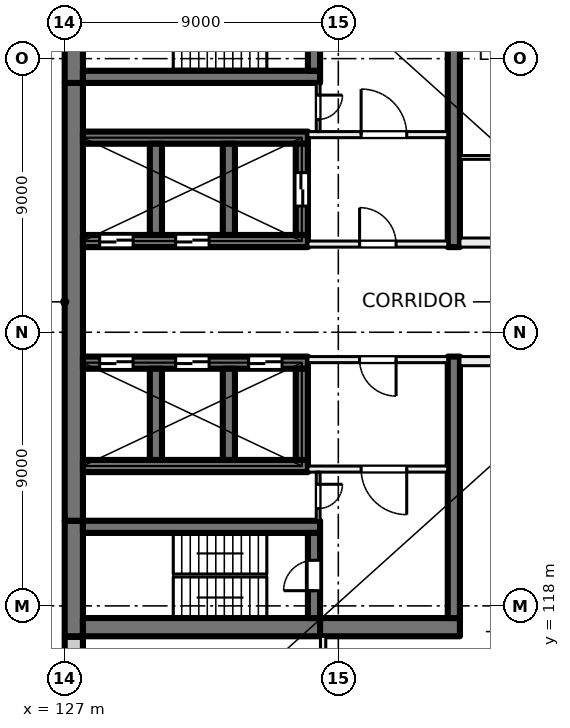
"""IFC4 building model, lengths in metres.
Left out: names, types, materials, properties, quantities, classifications, styles, units other than length and angle.
Written with IfcOpenShell. Run it as: python <this file> out.ifc"""

import sys

from ifc_helpers import new_model, si_unit, direction, frame, frame_2d, origin, place, context, subcontext, project, spatial, rectangle, extrude, element, fill, save


model = new_model("IFC4")
c1 = context("Model", 3, precision=1e-05, world=origin(), true_north=direction((0.0, 1.0)))
c2 = subcontext(c1, "Body", "Model", "MODEL_VIEW")
j1 = project(units=[si_unit("LENGTHUNIT", "METRE"), si_unit("PLANEANGLEUNIT", "RADIAN")], contexts=[c1])
p1 = place(None, origin())
s1 = spatial("IfcSite", under=j1, at=p1, CompositionType="ELEMENT")
p2 = place(p1, origin())
s2 = spatial("IfcBuilding", under=s1, at=p2, CompositionType="ELEMENT")
p3 = place(p2, frame((0.0, 0.0, 27.5)))
s3 = spatial("IfcBuildingStorey", under=s2, at=p3, CompositionType="ELEMENT", Elevation=27.5)
p4 = place(p3, frame((127.3, 117.0, 0.0), z_axis=(0.0, 0.0, 1.0), x_axis=(0.0, 1.0, 0.0)))
e1 = element("IfcWall", 1, at=p4, inside=s3, PredefinedType="SHEAR", context=c2, shape_type="SweptSolid", body=[
    extrude(rectangle(XDim=3.8, YDim=0.6, at=frame_2d((1.9, 0.0))), origin(), (0.0, 0.0, 1.0), 4.0),
])
p5 = place(p3, frame((127.3, 120.8, 0.0), z_axis=(0.0, 0.0, 1.0), x_axis=(0.0, 1.0, 0.0)))
e2 = element("IfcWall", 2, at=p5, inside=s3, PredefinedType="SHEAR", context=c2, shape_type="SweptSolid", body=[
    extrude(rectangle(XDim=14.4, YDim=0.6, at=frame_2d((7.2, 0.0))), origin(), (0.0, 0.0, 1.0), 4.0),
])
p6 = place(p3, frame((127.3, 135.2, 0.0), z_axis=(0.0, 0.0, 1.0), x_axis=(0.0, 1.0, 0.0)))
e3 = element("IfcWall", 3, at=p6, inside=s3, PredefinedType="SHEAR", context=c2, shape_type="SweptSolid", body=[
    extrude(rectangle(XDim=3.8, YDim=0.6, at=frame_2d((1.9, 0.0))), origin(), (0.0, 0.0, 1.0), 4.0),
])
p7 = place(p3, frame((127.6, 117.3, 0.0), z_axis=(0.0, 0.0, 1.0), x_axis=(1.0, 0.0, 0.0)))
e4 = element("IfcWall", 4, at=p7, inside=s3, PredefinedType="SHEAR", context=c2, shape_type="SweptSolid", body=[
    extrude(rectangle(XDim=7.8, YDim=0.6, at=frame_2d((3.9, 0.0))), origin(), (0.0, 0.0, 1.0), 4.0),
])
p8 = place(p3, frame((135.4, 117.3, 0.0), z_axis=(0.0, 0.0, 1.0), x_axis=(1.0, 0.0, 0.0)))
e5 = element("IfcWall", 5, at=p8, inside=s3, PredefinedType="SHEAR", context=c2, shape_type="SweptSolid", body=[
    extrude(rectangle(XDim=4.6, YDim=0.6, at=frame_2d((2.3, 0.0))), origin(), (0.0, 0.0, 1.0), 4.0),
])
p9 = place(p3, frame((127.6, 120.6, 0.0), z_axis=(0.0, 0.0, 1.0), x_axis=(1.0, 0.0, 0.0)))
e6 = element("IfcWall", 6, at=p9, inside=s3, PredefinedType="SHEAR", context=c2, shape_type="SweptSolid", body=[
    extrude(rectangle(XDim=7.8, YDim=0.4, at=frame_2d((3.9, 0.0))), origin(), (0.0, 0.0, 1.0), 4.0),
])
p10 = place(p3, frame((135.2, 117.6, 0.0), z_axis=(0.0, 0.0, 1.0), x_axis=(0.0, 1.0, 0.0)))
e7 = element("IfcWall", 7, at=p10, inside=s3, PredefinedType="SHEAR", context=c2, shape_type="SweptSolid", body=[
    extrude(rectangle(XDim=2.8, YDim=0.4, at=frame_2d((1.4, 0.0))), origin(), (0.0, 0.0, 1.0), 4.0),
])
p11 = place(p10, frame((0.9, 0.0, 0.0)))
e8 = element("IfcOpeningElement", 8, at=p11, cuts=e7, PredefinedType="OPENING", context=c2, shape_type="SweptSolid", body=[
    extrude(rectangle(XDim=1.0, YDim=2.1, at=frame_2d((0.5, 1.05))), frame((0.0, 0.21, 0.0), z_axis=(0.0, -1.0, 0.0), x_axis=(1.0, 0.0, 0.0)), (0.0, 0.0, 1.0), 0.42),
])
p12 = place(p3, frame((127.6, 135.4, 0.0), z_axis=(0.0, 0.0, 1.0), x_axis=(1.0, 0.0, 0.0)))
e9 = element("IfcWall", 9, at=p12, inside=s3, PredefinedType="SHEAR", context=c2, shape_type="SweptSolid", body=[
    extrude(rectangle(XDim=7.8, YDim=0.4, at=frame_2d((3.9, 0.0))), origin(), (0.0, 0.0, 1.0), 4.0),
])
p13 = place(p3, frame((135.2, 135.6, 0.0), z_axis=(0.0, 0.0, 1.0), x_axis=(0.0, 1.0, 0.0)))
e10 = element("IfcWall", 10, at=p13, inside=s3, PredefinedType="SHEAR", context=c2, shape_type="SweptSolid", body=[
    extrude(rectangle(XDim=2.8, YDim=0.4, at=frame_2d((1.4, 0.0))), origin(), (0.0, 0.0, 1.0), 4.0),
])
p14 = place(p13, frame((0.9, 0.0, 0.0)))
e11 = element("IfcOpeningElement", 11, at=p14, cuts=e10, PredefinedType="OPENING", context=c2, shape_type="SweptSolid", body=[
    extrude(rectangle(XDim=1.0, YDim=2.1, at=frame_2d((0.5, 1.05))), frame((0.0, 0.21, 0.0), z_axis=(0.0, -1.0, 0.0), x_axis=(1.0, 0.0, 0.0)), (0.0, 0.0, 1.0), 0.42),
])
p15 = place(p3, frame((127.6, 126.0, 0.0), z_axis=(0.0, 0.0, 1.0), x_axis=(1.0, 0.0, 0.0)))
e12 = element("IfcWall", 12, at=p15, inside=s3, PredefinedType="SHEAR", context=c2, shape_type="SweptSolid", body=[
    extrude(rectangle(XDim=7.4, YDim=0.4, at=frame_2d((3.7, 0.0))), origin(), (0.0, 0.0, 1.0), 4.0),
])
p16 = place(p15, frame((0.55, 0.0, 0.0)))
e13 = element("IfcOpeningElement", 13, at=p16, cuts=e12, PredefinedType="OPENING", context=c2, shape_type="SweptSolid", body=[
    extrude(rectangle(XDim=1.1, YDim=2.1, at=frame_2d((0.55, 1.05))), frame((0.0, 0.21, 0.0), z_axis=(0.0, -1.0, 0.0), x_axis=(1.0, 0.0, 0.0)), (0.0, 0.0, 1.0), 0.42),
])
p17 = place(p15, frame((3.05, 0.0, 0.0)))
e14 = element("IfcOpeningElement", 14, at=p17, cuts=e12, PredefinedType="OPENING", context=c2, shape_type="SweptSolid", body=[
    extrude(rectangle(XDim=1.1, YDim=2.1, at=frame_2d((0.55, 1.05))), frame((0.0, 0.21, 0.0), z_axis=(0.0, -1.0, 0.0), x_axis=(1.0, 0.0, 0.0)), (0.0, 0.0, 1.0), 0.42),
])
p18 = place(p15, frame((5.45, 0.0, 0.0)))
e15 = element("IfcOpeningElement", 15, at=p18, cuts=e12, PredefinedType="OPENING", context=c2, shape_type="SweptSolid", body=[
    extrude(rectangle(XDim=1.1, YDim=2.1, at=frame_2d((0.55, 1.05))), frame((0.0, 0.21, 0.0), z_axis=(0.0, -1.0, 0.0), x_axis=(1.0, 0.0, 0.0)), (0.0, 0.0, 1.0), 0.42),
])
p19 = place(p3, frame((127.6, 122.6, 0.0), z_axis=(0.0, 0.0, 1.0), x_axis=(1.0, 0.0, 0.0)))
e16 = element("IfcWall", 16, at=p19, inside=s3, PredefinedType="SHEAR", context=c2, shape_type="SweptSolid", body=[
    extrude(rectangle(XDim=7.4, YDim=0.4, at=frame_2d((3.7, 0.0))), origin(), (0.0, 0.0, 1.0), 4.0),
])
for number, where, z_axis, x_axis in (
    (17, (130.0, 122.8, 0.0), (0.0, 0.0, 1.0), (0.0, 1.0, 0.0)),
    (18, (132.4, 122.8, 0.0), (0.0, 0.0, 1.0), (0.0, 1.0, 0.0)),
    (19, (134.8, 122.8, 0.0), (0.0, 0.0, 1.0), (0.0, 1.0, 0.0)),
):
    element("IfcWall", number, at=place(p3, frame(where, z_axis=z_axis, x_axis=x_axis)), inside=s3, PredefinedType="SHEAR", context=c2, shape_type="SweptSolid", body=[
        extrude(rectangle(XDim=3.0, YDim=0.4, at=frame_2d((1.5, 0.0))), origin(), (0.0, 0.0, 1.0), 4.0),
    ])
p20 = place(p3, frame((127.6, 130.0, 0.0), z_axis=(0.0, 0.0, 1.0), x_axis=(1.0, 0.0, 0.0)))
e20 = element("IfcWall", 20, at=p20, inside=s3, PredefinedType="SHEAR", context=c2, shape_type="SweptSolid", body=[
    extrude(rectangle(XDim=7.4, YDim=0.4, at=frame_2d((3.7, 0.0))), origin(), (0.0, 0.0, 1.0), 4.0),
])
p21 = place(p20, frame((0.55, 0.0, 0.0)))
e21 = element("IfcOpeningElement", 21, at=p21, cuts=e20, PredefinedType="OPENING", context=c2, shape_type="SweptSolid", body=[
    extrude(rectangle(XDim=1.1, YDim=2.1, at=frame_2d((0.55, 1.05))), frame((0.0, 0.21, 0.0), z_axis=(0.0, -1.0, 0.0), x_axis=(1.0, 0.0, 0.0)), (0.0, 0.0, 1.0), 0.42),
])
p22 = place(p20, frame((3.05, 0.0, 0.0)))
e22 = element("IfcOpeningElement", 22, at=p22, cuts=e20, PredefinedType="OPENING", context=c2, shape_type="SweptSolid", body=[
    extrude(rectangle(XDim=1.1, YDim=2.1, at=frame_2d((0.55, 1.05))), frame((0.0, 0.21, 0.0), z_axis=(0.0, -1.0, 0.0), x_axis=(1.0, 0.0, 0.0)), (0.0, 0.0, 1.0), 0.42),
])
p23 = place(p3, frame((127.6, 133.4, 0.0), z_axis=(0.0, 0.0, 1.0), x_axis=(1.0, 0.0, 0.0)))
e23 = element("IfcWall", 23, at=p23, inside=s3, PredefinedType="SHEAR", context=c2, shape_type="SweptSolid", body=[
    extrude(rectangle(XDim=7.4, YDim=0.4, at=frame_2d((3.7, 0.0))), origin(), (0.0, 0.0, 1.0), 4.0),
])
for number, where, z_axis, x_axis in (
    (24, (130.0, 130.2, 0.0), (0.0, 0.0, 1.0), (0.0, 1.0, 0.0)),
    (25, (132.4, 130.2, 0.0), (0.0, 0.0, 1.0), (0.0, 1.0, 0.0)),
):
    element("IfcWall", number, at=place(p3, frame(where, z_axis=z_axis, x_axis=x_axis)), inside=s3, PredefinedType="SHEAR", context=c2, shape_type="SweptSolid", body=[
        extrude(rectangle(XDim=3.0, YDim=0.4, at=frame_2d((1.5, 0.0))), origin(), (0.0, 0.0, 1.0), 4.0),
    ])
p24 = place(p3, frame((134.8, 130.2, 0.0), z_axis=(0.0, 0.0, 1.0), x_axis=(0.0, 1.0, 0.0)))
e26 = element("IfcWall", 26, at=p24, inside=s3, PredefinedType="SHEAR", context=c2, shape_type="SweptSolid", body=[
    extrude(rectangle(XDim=3.0, YDim=0.4, at=frame_2d((1.5, 0.0))), origin(), (0.0, 0.0, 1.0), 4.0),
])
p25 = place(p24, frame((0.95, 0.0, 0.0)))
e27 = element("IfcOpeningElement", 27, at=p25, cuts=e26, PredefinedType="OPENING", context=c2, shape_type="SweptSolid", body=[
    extrude(rectangle(XDim=1.1, YDim=2.1, at=frame_2d((0.55, 1.05))), frame((0.0, 0.21, 0.0), z_axis=(0.0, -1.0, 0.0), x_axis=(1.0, 0.0, 0.0)), (0.0, 0.0, 1.0), 0.42),
])
for number, where, z_axis, x_axis in (
    (28, (139.8, 117.6, 0.0), (0.0, 0.0, 1.0), (0.0, 1.0, 0.0)),
    (29, (139.8, 129.8, 0.0), (0.0, 0.0, 1.0), (0.0, 1.0, 0.0)),
):
    element("IfcWall", number, at=place(p3, frame(where, z_axis=z_axis, x_axis=x_axis)), inside=s3, PredefinedType="SHEAR", context=c2, shape_type="SweptSolid", body=[
        extrude(rectangle(XDim=8.6, YDim=0.4, at=frame_2d((4.3, 0.0))), origin(), (0.0, 0.0, 1.0), 4.0),
    ])
p26 = place(p3, frame((127.3, 114.07, 0.0), z_axis=(0.0, 0.0, 1.0), x_axis=(0.0, 1.0, 0.0)))
e30 = element("IfcWall", 30, at=p26, inside=s3, PredefinedType="SOLIDWALL", context=c2, shape_type="SweptSolid", body=[
    extrude(rectangle(XDim=2.91, YDim=0.6, at=frame_2d((1.455, 0.0))), origin(), (0.0, 0.0, 1.0), 3.625),
])
p27 = place(p3, frame((135.0, 129.9, 0.0), z_axis=(0.0, 0.0, 1.0), x_axis=(1.0, 0.0, 0.0)))
e31 = element("IfcWall", 31, at=p27, inside=s3, PredefinedType="PARTITIONING", context=c2, shape_type="SweptSolid", body=[
    extrude(rectangle(XDim=4.6, YDim=0.2, at=frame_2d((2.3, 0.0))), origin(), (0.0, 0.0, 1.0), 3.625),
])
p28 = place(p27, frame((1.7, 0.0, 0.0)))
e32 = element("IfcOpeningElement", 32, at=p28, cuts=e31, PredefinedType="OPENING", context=c2, shape_type="SweptSolid", body=[
    extrude(rectangle(XDim=1.2, YDim=2.1, at=frame_2d((0.6, 1.05))), frame((0.0, 0.11, 0.0), z_axis=(0.0, -1.0, 0.0), x_axis=(1.0, 0.0, 0.0)), (0.0, 0.0, 1.0), 0.22),
])
p29 = place(p3, frame((135.0, 133.5, 0.0), z_axis=(0.0, 0.0, 1.0), x_axis=(1.0, 0.0, 0.0)))
e33 = element("IfcWall", 33, at=p29, inside=s3, PredefinedType="PARTITIONING", context=c2, shape_type="SweptSolid", body=[
    extrude(rectangle(XDim=4.6, YDim=0.2, at=frame_2d((2.3, 0.0))), origin(), (0.0, 0.0, 1.0), 3.625),
])
p30 = place(p29, frame((1.75, 0.0, 0.0)))
e34 = element("IfcOpeningElement", 34, at=p30, cuts=e33, PredefinedType="OPENING", context=c2, shape_type="SweptSolid", body=[
    extrude(rectangle(XDim=1.5, YDim=2.1, at=frame_2d((0.75, 1.05))), frame((0.0, 0.11, 0.0), z_axis=(0.0, -1.0, 0.0), x_axis=(1.0, 0.0, 0.0)), (0.0, 0.0, 1.0), 0.22),
])
p31 = place(p3, frame((135.337, 135.2, 0.0), z_axis=(0.0, 0.0, 1.0), x_axis=(0.0, -1.0, 0.0)))
e35 = element("IfcWall", 35, at=p31, inside=s3, PredefinedType="PARTITIONING", context=c2, shape_type="SweptSolid", body=[
    extrude(rectangle(XDim=1.6, YDim=0.125, at=frame_2d((0.8, 0.0))), origin(), (0.0, 0.0, 1.0), 3.625),
])
p32 = place(p31, frame((0.4, 0.0, 0.0)))
e36 = element("IfcOpeningElement", 36, at=p32, cuts=e35, PredefinedType="OPENING", context=c2, shape_type="SweptSolid", body=[
    extrude(rectangle(XDim=0.8, YDim=2.1, at=frame_2d((0.4, 1.05))), frame((0.0, 0.073, 0.0), z_axis=(0.0, -1.0, 0.0), x_axis=(1.0, 0.0, 0.0)), (0.0, 0.0, 1.0), 0.145),
])
p33 = place(p3, frame((139.6, 126.1, 0.0), z_axis=(0.0, 0.0, 1.0), x_axis=(-1.0, 0.0, 0.0)))
e37 = element("IfcWall", 37, at=p33, inside=s3, PredefinedType="PARTITIONING", context=c2, shape_type="SweptSolid", body=[
    extrude(rectangle(XDim=4.6, YDim=0.2, at=frame_2d((2.3, 0.0))), origin(), (0.0, 0.0, 1.0), 3.625),
])
p34 = place(p33, frame((1.7, 0.0, 0.0)))
e38 = element("IfcOpeningElement", 38, at=p34, cuts=e37, PredefinedType="OPENING", context=c2, shape_type="SweptSolid", body=[
    extrude(rectangle(XDim=1.2, YDim=2.1, at=frame_2d((0.6, 1.05))), frame((0.0, 0.11, 0.0), z_axis=(0.0, -1.0, 0.0), x_axis=(1.0, 0.0, 0.0)), (0.0, 0.0, 1.0), 0.22),
])
p35 = place(p3, frame((139.6, 122.5, 0.0), z_axis=(0.0, 0.0, 1.0), x_axis=(-1.0, 0.0, 0.0)))
e39 = element("IfcWall", 39, at=p35, inside=s3, PredefinedType="PARTITIONING", context=c2, shape_type="SweptSolid", body=[
    extrude(rectangle(XDim=4.6, YDim=0.2, at=frame_2d((2.3, 0.0))), origin(), (0.0, 0.0, 1.0), 3.625),
])
p36 = place(p35, frame((1.35, 0.0, 0.0)))
e40 = element("IfcOpeningElement", 40, at=p36, cuts=e39, PredefinedType="OPENING", context=c2, shape_type="SweptSolid", body=[
    extrude(rectangle(XDim=1.5, YDim=2.1, at=frame_2d((0.75, 1.05))), frame((0.0, 0.11, 0.0), z_axis=(0.0, -1.0, 0.0), x_axis=(1.0, 0.0, 0.0)), (0.0, 0.0, 1.0), 0.22),
])
p37 = place(p3, frame((135.337, 122.4, 0.0), z_axis=(0.0, 0.0, 1.0), x_axis=(0.0, -1.0, 0.0)))
e41 = element("IfcWall", 41, at=p37, inside=s3, PredefinedType="PARTITIONING", context=c2, shape_type="SweptSolid", body=[
    extrude(rectangle(XDim=1.6, YDim=0.125, at=frame_2d((0.8, 0.0))), origin(), (0.0, 0.0, 1.0), 3.625),
])
p38 = place(p37, frame((0.4, 0.0, 0.0)))
e42 = element("IfcOpeningElement", 42, at=p38, cuts=e41, PredefinedType="OPENING", context=c2, shape_type="SweptSolid", body=[
    extrude(rectangle(XDim=0.8, YDim=2.1, at=frame_2d((0.4, 1.05))), frame((0.0, 0.073, 0.0), z_axis=(0.0, -1.0, 0.0), x_axis=(1.0, 0.0, 0.0)), (0.0, 0.0, 1.0), 0.145),
])
p39 = place(p3, frame((135.5, 117.0, 0.0), z_axis=(0.0, 0.0, 1.0), x_axis=(0.0, -1.0, 0.0)))
e43 = element("IfcWall", 43, at=p39, inside=s3, PredefinedType="PARTITIONING", context=c2, shape_type="SweptSolid", body=[
    extrude(rectangle(XDim=6.4, YDim=0.175, at=frame_2d((3.2, 0.0))), origin(), (0.0, 0.0, 1.0), 3.625),
])
p40 = place(p39, frame((2.6, 0.0, 0.0)))
e44 = element("IfcOpeningElement", 44, at=p40, cuts=e43, PredefinedType="OPENING", context=c2, shape_type="SweptSolid", body=[
    extrude(rectangle(XDim=1.2, YDim=2.1, at=frame_2d((0.6, 1.05))), frame((0.0, 0.097, 0.0), z_axis=(0.0, -1.0, 0.0), x_axis=(1.0, 0.0, 0.0)), (0.0, 0.0, 1.0), 0.195),
])
p41 = place(p3, frame((140.0, 129.95, 0.0), z_axis=(0.0, 0.0, 1.0), x_axis=(1.0, 0.0, 0.0)))
e45 = element("IfcWall", 45, at=p41, inside=s3, PredefinedType="PARTITIONING", context=c2, shape_type="SweptSolid", body=[
    extrude(rectangle(XDim=14.0, YDim=0.3, at=frame_2d((7.0, 0.0))), origin(), (0.0, 0.0, 1.0), 3.625),
])
p42 = place(p41, frame((2.75, 0.0, 0.0)))
e46 = element("IfcOpeningElement", 46, at=p42, cuts=e45, PredefinedType="OPENING", context=c2, shape_type="SweptSolid", body=[
    extrude(rectangle(XDim=1.0, YDim=2.1, at=frame_2d((0.5, 1.05))), frame((0.0, 0.16, 0.0), z_axis=(0.0, -1.0, 0.0), x_axis=(1.0, 0.0, 0.0)), (0.0, 0.0, 1.0), 0.32),
])
p43 = place(p41, frame((10.6, 0.0, 0.0)))
e47 = element("IfcOpeningElement", 47, at=p43, cuts=e45, PredefinedType="OPENING", context=c2, shape_type="SweptSolid", body=[
    extrude(rectangle(XDim=1.8, YDim=2.1, at=frame_2d((0.9, 1.05))), frame((0.0, 0.16, 0.0), z_axis=(0.0, -1.0, 0.0), x_axis=(1.0, 0.0, 0.0)), (0.0, 0.0, 1.0), 0.32),
])
p44 = place(p3, frame((140.0, 132.75, 0.0), z_axis=(0.0, 0.0, 1.0), x_axis=(1.0, 0.0, 0.0)))
e48 = element("IfcWall", 48, at=p44, inside=s3, PredefinedType="PARTITIONING", context=c2, shape_type="SweptSolid", body=[
    extrude(rectangle(XDim=8.938, YDim=0.125, at=frame_2d((4.469, 0.0))), origin(), (0.0, 0.0, 1.0), 3.625),
])
p45 = place(p44, frame((1.85, 0.0, 0.0)))
e49 = element("IfcOpeningElement", 49, at=p45, cuts=e48, PredefinedType="OPENING", context=c2, shape_type="SweptSolid", body=[
    extrude(rectangle(XDim=0.8, YDim=2.1, at=frame_2d((0.4, 1.05))), frame((0.0, 0.073, 0.0), z_axis=(0.0, -1.0, 0.0), x_axis=(1.0, 0.0, 0.0)), (0.0, 0.0, 1.0), 0.145),
])
p46 = place(p44, frame((5.102, 0.0, 0.0)))
e50 = element("IfcOpeningElement", 50, at=p46, cuts=e48, PredefinedType="OPENING", context=c2, shape_type="SweptSolid", body=[
    extrude(rectangle(XDim=0.8, YDim=2.1, at=frame_2d((0.4, 1.05))), frame((0.0, 0.073, 0.0), z_axis=(0.0, -1.0, 0.0), x_axis=(1.0, 0.0, 0.0)), (0.0, 0.0, 1.0), 0.145),
])
p47 = place(p3, frame((154.0, 126.05, 0.0), z_axis=(0.0, 0.0, 1.0), x_axis=(-1.0, 0.0, 0.0)))
e51 = element("IfcWall", 51, at=p47, inside=s3, PredefinedType="PARTITIONING", context=c2, shape_type="SweptSolid", body=[
    extrude(rectangle(XDim=14.0, YDim=0.3, at=frame_2d((7.0, 0.0))), origin(), (0.0, 0.0, 1.0), 3.625),
])
p48 = place(p47, frame((6.1, 0.0, 0.0)))
e52 = element("IfcOpeningElement", 52, at=p48, cuts=e51, PredefinedType="OPENING", context=c2, shape_type="SweptSolid", body=[
    extrude(rectangle(XDim=1.8, YDim=2.1, at=frame_2d((0.9, 1.05))), frame((0.0, 0.16, 0.0), z_axis=(0.0, -1.0, 0.0), x_axis=(1.0, 0.0, 0.0)), (0.0, 0.0, 1.0), 0.32),
])
p49 = place(p21, origin())
e53 = element("IfcDoor", 53, at=p49, inside=s3, OperationType="DOUBLE_DOOR_SLIDING", PredefinedType="DOOR", context=c2, shape_type="SweptSolid", body=[
    extrude(rectangle(XDim=1.1, YDim=2.1, at=frame_2d((0.55, 1.05))), frame((0.0, 0.025, 0.0), z_axis=(0.0, -1.0, 0.0), x_axis=(1.0, 0.0, 0.0)), (0.0, 0.0, 1.0), 0.05),
])
fill(e21, e53)
p50 = place(p22, origin())
e54 = element("IfcDoor", 54, at=p50, inside=s3, OperationType="DOUBLE_DOOR_SLIDING", PredefinedType="DOOR", context=c2, shape_type="SweptSolid", body=[
    extrude(rectangle(XDim=1.1, YDim=2.1, at=frame_2d((0.55, 1.05))), frame((0.0, 0.025, 0.0), z_axis=(0.0, -1.0, 0.0), x_axis=(1.0, 0.0, 0.0)), (0.0, 0.0, 1.0), 0.05),
])
fill(e22, e54)
p51 = place(p16, origin())
e55 = element("IfcDoor", 55, at=p51, inside=s3, OperationType="DOUBLE_DOOR_SLIDING", PredefinedType="DOOR", context=c2, shape_type="SweptSolid", body=[
    extrude(rectangle(XDim=1.1, YDim=2.1, at=frame_2d((0.55, 1.05))), frame((0.0, 0.025, 0.0), z_axis=(0.0, -1.0, 0.0), x_axis=(1.0, 0.0, 0.0)), (0.0, 0.0, 1.0), 0.05),
])
fill(e13, e55)
p52 = place(p17, origin())
e56 = element("IfcDoor", 56, at=p52, inside=s3, OperationType="DOUBLE_DOOR_SLIDING", PredefinedType="DOOR", context=c2, shape_type="SweptSolid", body=[
    extrude(rectangle(XDim=1.1, YDim=2.1, at=frame_2d((0.55, 1.05))), frame((0.0, 0.025, 0.0), z_axis=(0.0, -1.0, 0.0), x_axis=(1.0, 0.0, 0.0)), (0.0, 0.0, 1.0), 0.05),
])
fill(e14, e56)
p53 = place(p18, origin())
e57 = element("IfcDoor", 57, at=p53, inside=s3, OperationType="DOUBLE_DOOR_SLIDING", PredefinedType="DOOR", context=c2, shape_type="SweptSolid", body=[
    extrude(rectangle(XDim=1.1, YDim=2.1, at=frame_2d((0.55, 1.05))), frame((0.0, 0.025, 0.0), z_axis=(0.0, -1.0, 0.0), x_axis=(1.0, 0.0, 0.0)), (0.0, 0.0, 1.0), 0.05),
])
fill(e15, e57)
p54 = place(p28, origin())
e58 = element("IfcDoor", 58, at=p54, inside=s3, OperationType="DOUBLE_DOOR_SINGLE_SWING", PredefinedType="DOOR", context=c2, shape_type="SweptSolid", body=[
    extrude(rectangle(XDim=1.2, YDim=2.1, at=frame_2d((0.6, 1.05))), frame((0.0, 0.025, 0.0), z_axis=(0.0, -1.0, 0.0), x_axis=(1.0, 0.0, 0.0)), (0.0, 0.0, 1.0), 0.05),
])
fill(e32, e58)
p55 = place(p30, origin())
e59 = element("IfcDoor", 59, at=p55, inside=s3, OperationType="DOUBLE_DOOR_SINGLE_SWING", PredefinedType="DOOR", context=c2, shape_type="SweptSolid", body=[
    extrude(rectangle(XDim=1.5, YDim=2.1, at=frame_2d((0.75, 1.05))), frame((0.0, 0.025, 0.0), z_axis=(0.0, -1.0, 0.0), x_axis=(1.0, 0.0, 0.0)), (0.0, 0.0, 1.0), 0.05),
])
fill(e34, e59)
p56 = place(p32, origin())
e60 = element("IfcDoor", 60, at=p56, inside=s3, OperationType="SINGLE_SWING_RIGHT", PredefinedType="DOOR", context=c2, shape_type="SweptSolid", body=[
    extrude(rectangle(XDim=0.8, YDim=2.1, at=frame_2d((0.4, 1.05))), frame((0.0, 0.025, 0.0), z_axis=(0.0, -1.0, 0.0), x_axis=(1.0, 0.0, 0.0)), (0.0, 0.0, 1.0), 0.05),
])
fill(e36, e60)
p57 = place(p34, origin())
e61 = element("IfcDoor", 61, at=p57, inside=s3, OperationType="DOUBLE_DOOR_SINGLE_SWING", PredefinedType="DOOR", context=c2, shape_type="SweptSolid", body=[
    extrude(rectangle(XDim=1.2, YDim=2.1, at=frame_2d((0.6, 1.05))), frame((0.0, 0.025, 0.0), z_axis=(0.0, -1.0, 0.0), x_axis=(1.0, 0.0, 0.0)), (0.0, 0.0, 1.0), 0.05),
])
fill(e38, e61)
p58 = place(p36, origin())
e62 = element("IfcDoor", 62, at=p58, inside=s3, OperationType="DOUBLE_DOOR_SINGLE_SWING", PredefinedType="DOOR", context=c2, shape_type="SweptSolid", body=[
    extrude(rectangle(XDim=1.5, YDim=2.1, at=frame_2d((0.75, 1.05))), frame((0.0, 0.025, 0.0), z_axis=(0.0, -1.0, 0.0), x_axis=(1.0, 0.0, 0.0)), (0.0, 0.0, 1.0), 0.05),
])
fill(e40, e62)
p59 = place(p11, origin())
e63 = element("IfcDoor", 63, at=p59, inside=s3, OperationType="SINGLE_SWING_RIGHT", PredefinedType="DOOR", context=c2, shape_type="SweptSolid", body=[
    extrude(rectangle(XDim=1.0, YDim=2.1, at=frame_2d((0.5, 1.05))), frame((0.0, 0.025, 0.0), z_axis=(0.0, -1.0, 0.0), x_axis=(1.0, 0.0, 0.0)), (0.0, 0.0, 1.0), 0.05),
])
fill(e8, e63)
p60 = place(p38, origin())
e64 = element("IfcDoor", 64, at=p60, inside=s3, OperationType="SINGLE_SWING_LEFT", PredefinedType="DOOR", context=c2, shape_type="SweptSolid", body=[
    extrude(rectangle(XDim=0.8, YDim=2.1, at=frame_2d((0.4, 1.05))), frame((0.0, 0.025, 0.0), z_axis=(0.0, -1.0, 0.0), x_axis=(1.0, 0.0, 0.0)), (0.0, 0.0, 1.0), 0.05),
])
fill(e42, e64)
p61 = place(p25, origin())
e65 = element("IfcDoor", 65, at=p61, inside=s3, OperationType="DOUBLE_DOOR_SLIDING", PredefinedType="DOOR", context=c2, shape_type="SweptSolid", body=[
    extrude(rectangle(XDim=1.1, YDim=2.1, at=frame_2d((0.55, 1.05))), frame((0.0, 0.025, 0.0), z_axis=(0.0, -1.0, 0.0), x_axis=(1.0, 0.0, 0.0)), (0.0, 0.0, 1.0), 0.05),
])
fill(e27, e65)
save(model, sys.argv[1])
